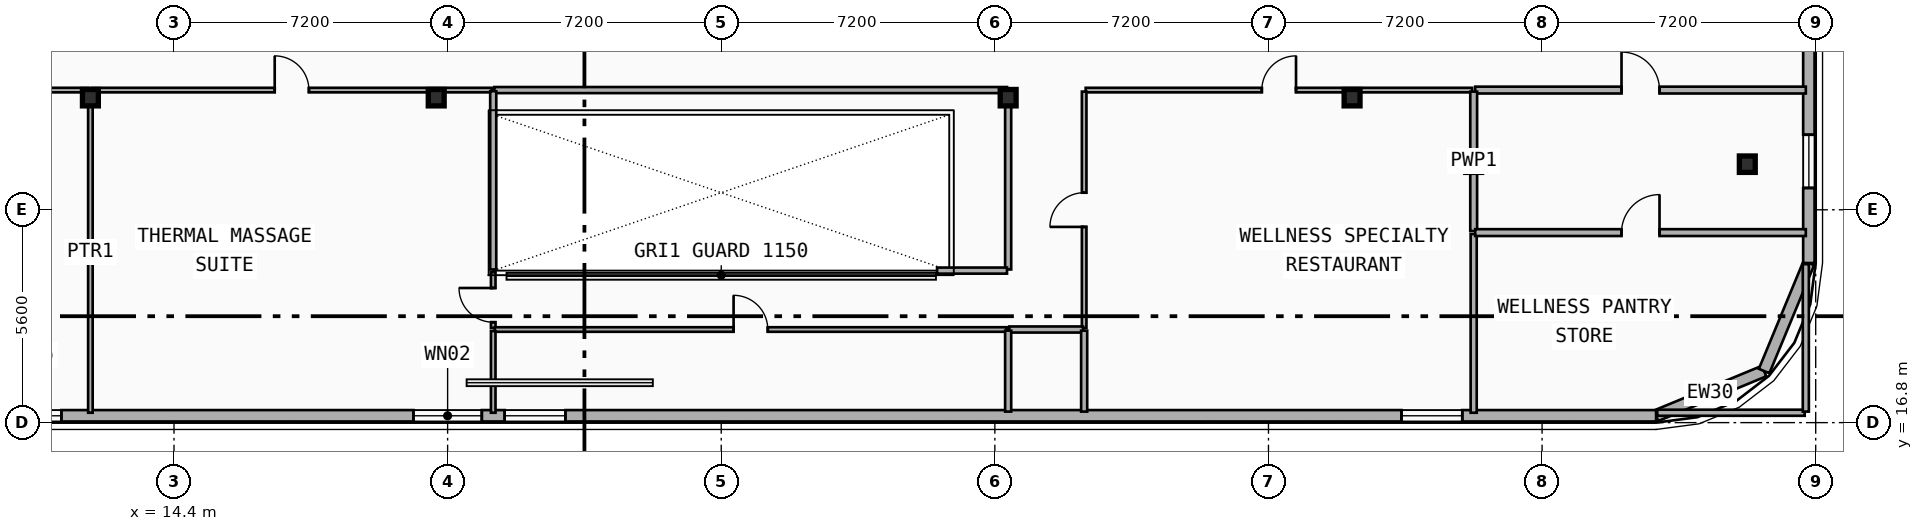
"""IFC4 building model, lengths in metres.
Left out: names, types, materials, properties, quantities, classifications, styles, units other than length and angle.
Written with IfcOpenShell. Run it as: python <this file> out.ifc"""

import sys

from ifc_helpers import new_model, si_unit, direction, frame, frame_2d, origin, origin_2d, place, context, subcontext, project, spatial, rectangle, i_section, extrude, element, fill, save


model = new_model("IFC4")
c1 = context("Model", 3, precision=1e-05, world=origin(), true_north=direction((0.0, 1.0)))
c2 = subcontext(c1, "Body", "Model", "MODEL_VIEW")
j1 = project(units=[si_unit("LENGTHUNIT", "METRE"), si_unit("PLANEANGLEUNIT", "RADIAN")], contexts=[c1])
p1 = place(None, origin())
s1 = spatial("IfcSite", under=j1, at=p1, CompositionType="ELEMENT")
p2 = place(p1, origin())
s2 = spatial("IfcBuilding", under=s1, at=p2, CompositionType="ELEMENT")
p3 = place(p2, frame((0.0, 0.0, 125.8)))
s3 = spatial("IfcBuildingStorey", under=s2, at=p3, CompositionType="ELEMENT", Elevation=125.8)
for number, where, z_axis, x_axis in (
    (1, (12.2, 25.35, 0.0), (0.0, 0.0, 1.0), (1.0, 0.0, 0.0)),
    (2, (21.3, 25.35, 0.0), (0.0, 0.0, 1.0), (1.0, 0.0, 0.0)),
    (3, (36.35, 25.35, 0.0), (0.0, 0.0, 1.0), (1.0, 0.0, 0.0)),
    (4, (45.4, 25.35, 0.0), (0.0, 0.0, 1.0), (1.0, 0.0, 0.0)),
    (5, (48.6, 23.6, 0.0), (0.0, 0.0, 1.0), (1.0, 0.0, 0.0)),
    (6, (55.8, 23.6, 0.0), (0.0, 0.0, 1.0), (1.0, 0.0, 0.0)),
):
    element("IfcColumn", number, at=place(p3, frame(where, z_axis=z_axis, x_axis=x_axis)), inside=s3, PredefinedType="COLUMN", context=c2, shape_type="SweptSolid", body=[
        extrude(i_section(OverallWidth=0.418, OverallDepth=0.432, WebThickness=0.035, FlangeThickness=0.056, FilletRadius=0.015, at=origin_2d()), origin(), (0.0, 0.0, 1.0), 3.5),
    ])
p4 = place(p3, frame((56.243, 18.157, 0.0), z_axis=(0.0, 0.0, 1.0), x_axis=(-0.923882414032, -0.382676475685, 0.0)))
e7 = element("IfcWall", 7, at=p4, inside=s3, PredefinedType="SOLIDWALL", context=c2, shape_type="SweptSolid", body=[
    extrude(rectangle(XDim=3.077, YDim=0.3, at=frame_2d((1.539, 0.0))), origin(), (0.0, 0.0, 1.0), 3.24),
])
p5 = place(p3, frame((57.42, 21.0, 0.0), z_axis=(0.0, 0.0, 1.0), x_axis=(-0.382636798336, -0.92389884758, 0.0)))
e8 = element("IfcWall", 8, at=p5, inside=s3, PredefinedType="SOLIDWALL", context=c2, shape_type="SweptSolid", body=[
    extrude(rectangle(XDim=3.077, YDim=0.3, at=frame_2d((1.538, 0.0))), origin(), (0.0, 0.0, 1.0), 3.24),
])
p6 = place(p3, frame((57.42, 39.0, 0.0), z_axis=(0.0, 0.0, 1.0), x_axis=(0.0, -1.0, 0.0)))
e9 = element("IfcWall", 9, at=p6, inside=s3, PredefinedType="SOLIDWALL", context=c2, shape_type="SweptSolid", body=[
    extrude(rectangle(XDim=18.0, YDim=0.3, at=frame_2d((9.0, 0.0))), origin(), (0.0, 0.0, 1.0), 3.24),
])
p7 = place(p6, frame((8.882, 0.0, 0.48)))
e10 = element("IfcOpeningElement", 10, at=p7, cuts=e9, PredefinedType="OPENING", context=c2, shape_type="SweptSolid", body=[
    extrude(rectangle(XDim=1.4, YDim=1.8, at=frame_2d((0.7, 0.9))), frame((0.0, 0.16, 0.0), z_axis=(0.0, -1.0, 0.0), x_axis=(1.0, 0.0, 0.0)), (0.0, 0.0, 1.0), 0.32),
])
p8 = place(p6, frame((3.621, 0.0, 0.48)))
e11 = element("IfcOpeningElement", 11, at=p8, cuts=e9, PredefinedType="OPENING", context=c2, shape_type="SweptSolid", body=[
    extrude(rectangle(XDim=1.4, YDim=1.8, at=frame_2d((0.7, 0.9))), frame((0.0, 0.16, 0.0), z_axis=(0.0, -1.0, 0.0), x_axis=(1.0, 0.0, 0.0)), (0.0, 0.0, 1.0), 0.32),
])
p9 = place(p6, frame((14.625, 0.0, 0.48)))
e12 = element("IfcOpeningElement", 12, at=p9, cuts=e9, PredefinedType="OPENING", context=c2, shape_type="SweptSolid", body=[
    extrude(rectangle(XDim=1.4, YDim=1.8, at=frame_2d((0.7, 0.9))), frame((0.0, 0.16, 0.0), z_axis=(0.0, -1.0, 0.0), x_axis=(1.0, 0.0, 0.0)), (0.0, 0.0, 1.0), 0.32),
])
p10 = place(p3, frame((53.4, 16.98, 0.0), z_axis=(0.0, 0.0, 1.0), x_axis=(-1.0, 0.0, 0.0)))
e13 = element("IfcWall", 13, at=p10, inside=s3, PredefinedType="SOLIDWALL", context=c2, shape_type="SweptSolid", body=[
    extrude(rectangle(XDim=49.2, YDim=0.3, at=frame_2d((24.6, 0.0))), origin(), (0.0, 0.0, 1.0), 3.24),
])
p11 = place(p10, frame((41.962, 0.0, 0.65)))
e14 = element("IfcOpeningElement", 14, at=p11, cuts=e13, PredefinedType="OPENING", context=c2, shape_type="SweptSolid", body=[
    extrude(rectangle(XDim=1.6, YDim=1.95, at=frame_2d((0.8, 0.975))), frame((0.0, 0.16, 0.0), z_axis=(0.0, -1.0, 0.0), x_axis=(1.0, 0.0, 0.0)), (0.0, 0.0, 1.0), 0.32),
])
p12 = place(p10, frame((30.9, 0.0, 0.48)))
e15 = element("IfcOpeningElement", 15, at=p12, cuts=e13, PredefinedType="OPENING", context=c2, shape_type="SweptSolid", body=[
    extrude(rectangle(XDim=1.8, YDim=1.8, at=frame_2d((0.9, 0.9))), frame((0.0, 0.16, 0.0), z_axis=(0.0, -1.0, 0.0), x_axis=(1.0, 0.0, 0.0)), (0.0, 0.0, 1.0), 0.32),
])
p13 = place(p10, frame((28.7, 0.0, 0.65)))
e16 = element("IfcOpeningElement", 16, at=p13, cuts=e13, PredefinedType="OPENING", context=c2, shape_type="SweptSolid", body=[
    extrude(rectangle(XDim=1.6, YDim=1.95, at=frame_2d((0.8, 0.975))), frame((0.0, 0.16, 0.0), z_axis=(0.0, -1.0, 0.0), x_axis=(1.0, 0.0, 0.0)), (0.0, 0.0, 1.0), 0.32),
])
p14 = place(p10, frame((5.1, 0.0, 0.65)))
e17 = element("IfcOpeningElement", 17, at=p14, cuts=e13, PredefinedType="OPENING", context=c2, shape_type="SweptSolid", body=[
    extrude(rectangle(XDim=1.6, YDim=1.95, at=frame_2d((0.8, 0.975))), frame((0.0, 0.16, 0.0), z_axis=(0.0, -1.0, 0.0), x_axis=(1.0, 0.0, 0.0)), (0.0, 0.0, 1.0), 0.32),
])
p15 = place(p3, frame((0.26, 25.55, 0.0), z_axis=(0.0, 0.0, 1.0), x_axis=(1.0, 0.0, 0.0)))
e18 = element("IfcWall", 18, at=p15, inside=s3, PredefinedType="PARTITIONING", context=c2, shape_type="SweptSolid", body=[
    extrude(rectangle(XDim=11.9, YDim=0.12, at=frame_2d((5.95, 0.0))), origin(), (0.0, 0.0, 1.0), 2.406),
])
p16 = place(p15, frame((5.5, 0.0, 0.0)))
e19 = element("IfcOpeningElement", 19, at=p16, cuts=e18, PredefinedType="OPENING", context=c2, shape_type="SweptSolid", body=[
    extrude(rectangle(XDim=0.9, YDim=2.1, at=frame_2d((0.45, 1.05))), frame((0.0, 0.07, 0.0), z_axis=(0.0, -1.0, 0.0), x_axis=(1.0, 0.0, 0.0)), (0.0, 0.0, 1.0), 0.14),
])
p17 = place(p3, frame((12.24, 25.55, 0.0), z_axis=(0.0, 0.0, 1.0), x_axis=(1.0, 0.0, 0.0)))
e20 = element("IfcWall", 20, at=p17, inside=s3, PredefinedType="PARTITIONING", context=c2, shape_type="SweptSolid", body=[
    extrude(rectangle(XDim=10.52, YDim=0.12, at=frame_2d((5.26, 0.0))), origin(), (0.0, 0.0, 1.0), 2.406),
])
p18 = place(p17, frame((4.81, 0.0, 0.0)))
e21 = element("IfcOpeningElement", 21, at=p18, cuts=e20, PredefinedType="OPENING", context=c2, shape_type="SweptSolid", body=[
    extrude(rectangle(XDim=0.9, YDim=2.1, at=frame_2d((0.45, 1.05))), frame((0.0, 0.07, 0.0), z_axis=(0.0, -1.0, 0.0), x_axis=(1.0, 0.0, 0.0)), (0.0, 0.0, 1.0), 0.14),
])
p19 = place(p3, frame((38.39, 25.55, 0.0), z_axis=(0.0, 0.0, 1.0), x_axis=(1.0, 0.0, 0.0)))
e22 = element("IfcWall", 22, at=p19, inside=s3, PredefinedType="PARTITIONING", context=c2, shape_type="SweptSolid", body=[
    extrude(rectangle(XDim=10.17, YDim=0.12, at=frame_2d((5.085, 0.0))), origin(), (0.0, 0.0, 1.0), 2.406),
])
p20 = place(p19, frame((4.635, 0.0, 0.0)))
e23 = element("IfcOpeningElement", 23, at=p20, cuts=e22, PredefinedType="OPENING", context=c2, shape_type="SweptSolid", body=[
    extrude(rectangle(XDim=0.9, YDim=2.1, at=frame_2d((0.45, 1.05))), frame((0.0, 0.07, 0.0), z_axis=(0.0, -1.0, 0.0), x_axis=(1.0, 0.0, 0.0)), (0.0, 0.0, 1.0), 0.14),
])
p21 = place(p3, frame((48.64, 25.55, 0.0), z_axis=(0.0, 0.0, 1.0), x_axis=(1.0, 0.0, 0.0)))
e24 = element("IfcWall", 24, at=p21, inside=s3, PredefinedType="PLUMBINGWALL", context=c2, shape_type="SweptSolid", body=[
    extrude(rectangle(XDim=8.7, YDim=0.18, at=frame_2d((4.35, 0.0))), origin(), (0.0, 0.0, 1.0), 2.57),
])
p22 = place(p21, frame((3.85, 0.0, 0.0)))
e25 = element("IfcOpeningElement", 25, at=p22, cuts=e24, PredefinedType="OPENING", context=c2, shape_type="SweptSolid", body=[
    extrude(rectangle(XDim=1.0, YDim=2.15, at=frame_2d((0.5, 1.075))), frame((0.0, 0.1, 0.0), z_axis=(0.0, -1.0, 0.0), x_axis=(1.0, 0.0, 0.0)), (0.0, 0.0, 1.0), 0.2),
])
p23 = place(p3, frame((38.35, 19.29, 0.0), z_axis=(0.0, 0.0, 1.0), x_axis=(0.0, 1.0, 0.0)))
e26 = element("IfcWall", 26, at=p23, inside=s3, PredefinedType="PARTITIONING", context=c2, shape_type="SweptSolid", body=[
    extrude(rectangle(XDim=6.22, YDim=0.12, at=frame_2d((3.11, 0.0))), origin(), (0.0, 0.0, 1.0), 2.77),
])
p24 = place(p23, frame((2.66, 0.0, 0.0)))
e27 = element("IfcOpeningElement", 27, at=p24, cuts=e26, PredefinedType="OPENING", context=c2, shape_type="SweptSolid", body=[
    extrude(rectangle(XDim=0.9, YDim=2.1, at=frame_2d((0.45, 1.05))), frame((0.0, 0.07, 0.0), z_axis=(0.0, -1.0, 0.0), x_axis=(1.0, 0.0, 0.0)), (0.0, 0.0, 1.0), 0.14),
])
p25 = place(p3, frame((22.8, 19.29, 0.0), z_axis=(0.0, 0.0, 1.0), x_axis=(0.0, 1.0, 0.0)))
e28 = element("IfcWall", 28, at=p25, inside=s3, PredefinedType="PARTITIONING", context=c2, shape_type="SweptSolid", body=[
    extrude(rectangle(XDim=1.47, YDim=0.12, at=frame_2d((0.735, 0.0))), origin(), (0.0, 0.0, 1.0), 2.68),
])
p26 = place(p25, frame((0.152, 0.0, 0.0)))
e29 = element("IfcOpeningElement", 29, at=p26, cuts=e28, PredefinedType="OPENING", context=c2, shape_type="SweptSolid", body=[
    extrude(rectangle(XDim=0.9, YDim=2.1, at=frame_2d((0.45, 1.05))), frame((0.0, 0.07, 0.0), z_axis=(0.0, -1.0, 0.0), x_axis=(1.0, 0.0, 0.0)), (0.0, 0.0, 1.0), 0.14),
])
p27 = place(p3, frame((22.84, 19.25, 0.0), z_axis=(0.0, 0.0, 1.0), x_axis=(1.0, 0.0, 0.0)))
e30 = element("IfcWall", 30, at=p27, inside=s3, PredefinedType="PARTITIONING", context=c2, shape_type="SweptSolid", body=[
    extrude(rectangle(XDim=13.47, YDim=0.12, at=frame_2d((6.735, 0.0))), origin(), (0.0, 0.0, 1.0), 2.406),
])
p28 = place(p27, frame((6.285, 0.0, 0.0)))
e31 = element("IfcOpeningElement", 31, at=p28, cuts=e30, PredefinedType="OPENING", context=c2, shape_type="SweptSolid", body=[
    extrude(rectangle(XDim=0.9, YDim=2.1, at=frame_2d((0.45, 1.05))), frame((0.0, 0.07, 0.0), z_axis=(0.0, -1.0, 0.0), x_axis=(1.0, 0.0, 0.0)), (0.0, 0.0, 1.0), 0.14),
])
p29 = place(p3, frame((12.2, 17.06, 0.0), z_axis=(0.0, 0.0, 1.0), x_axis=(0.0, 1.0, 0.0)))
e32 = element("IfcWall", 32, at=p29, inside=s3, PredefinedType="PARTITIONING", context=c2, shape_type="SweptSolid", body=[
    extrude(rectangle(XDim=8.45, YDim=0.12, at=frame_2d((4.225, 0.0))), origin(), (0.0, 0.0, 1.0), 2.406),
])
p30 = place(p3, frame((22.8, 17.06, 0.0), z_axis=(0.0, 0.0, 1.0), x_axis=(0.0, 1.0, 0.0)))
e33 = element("IfcWall", 33, at=p30, inside=s3, PredefinedType="PARTITIONING", context=c2, shape_type="SweptSolid", body=[
    extrude(rectangle(XDim=2.15, YDim=0.12, at=frame_2d((1.075, 0.0))), origin(), (0.0, 0.0, 1.0), 2.86),
])
p31 = place(p3, frame((48.6, 21.84, 0.0), z_axis=(0.0, 0.0, 1.0), x_axis=(0.0, 1.0, 0.0)))
e34 = element("IfcWall", 34, at=p31, inside=s3, PredefinedType="PLUMBINGWALL", context=c2, shape_type="SweptSolid", body=[
    extrude(rectangle(XDim=3.67, YDim=0.18, at=frame_2d((1.835, 0.0))), origin(), (0.0, 0.0, 1.0), 2.72),
])
p32 = place(p3, frame((48.6, 17.06, 0.0), z_axis=(0.0, 0.0, 1.0), x_axis=(0.0, 1.0, 0.0)))
e35 = element("IfcWall", 35, at=p32, inside=s3, PredefinedType="PARTITIONING", context=c2, shape_type="SweptSolid", body=[
    extrude(rectangle(XDim=4.7, YDim=0.16, at=frame_2d((2.35, 0.0))), origin(), (0.0, 0.0, 1.0), 2.72),
])
p33 = place(p3, frame((48.64, 21.8, 0.0), z_axis=(0.0, 0.0, 1.0), x_axis=(1.0, 0.0, 0.0)))
e36 = element("IfcWall", 36, at=p33, inside=s3, PredefinedType="PLUMBINGWALL", context=c2, shape_type="SweptSolid", body=[
    extrude(rectangle(XDim=8.7, YDim=0.18, at=frame_2d((4.35, 0.0))), origin(), (0.0, 0.0, 1.0), 2.57),
])
p34 = place(p33, frame((3.85, 0.0, 0.0)))
e37 = element("IfcOpeningElement", 37, at=p34, cuts=e36, PredefinedType="OPENING", context=c2, shape_type="SweptSolid", body=[
    extrude(rectangle(XDim=1.0, YDim=2.15, at=frame_2d((0.5, 1.075))), frame((0.0, 0.1, 0.0), z_axis=(0.0, -1.0, 0.0), x_axis=(1.0, 0.0, 0.0)), (0.0, 0.0, 1.0), 0.2),
])
p35 = place(p3, frame((22.83, 25.55, 0.0), z_axis=(0.0, 0.0, 1.0), x_axis=(1.0, 0.0, 0.0)))
e38 = element("IfcWall", 38, at=p35, inside=s3, PredefinedType="PARTITIONING", context=c2, shape_type="SweptSolid", body=[
    extrude(rectangle(XDim=13.49, YDim=0.16, at=frame_2d((6.745, 0.0))), origin(), (0.0, 0.0, 1.0), 2.406),
])
p36 = place(p3, frame((36.38, 19.25, 0.0), z_axis=(0.0, 0.0, 1.0), x_axis=(1.0, 0.0, 0.0)))
e39 = element("IfcWall", 39, at=p36, inside=s3, PredefinedType="PARTITIONING", context=c2, shape_type="SweptSolid", body=[
    extrude(rectangle(XDim=1.94, YDim=0.16, at=frame_2d((0.97, 0.0))), origin(), (0.0, 0.0, 1.0), 2.406),
])
p37 = place(p3, frame((36.35, 20.83, 0.0), z_axis=(0.0, 0.0, 1.0), x_axis=(0.0, 1.0, 0.0)))
e40 = element("IfcWall", 40, at=p37, inside=s3, PredefinedType="PARTITIONING", context=c2, shape_type="SweptSolid", body=[
    extrude(rectangle(XDim=4.69, YDim=0.16, at=frame_2d((2.345, 0.0))), origin(), (0.0, 0.0, 1.0), 2.406),
])
p38 = place(p3, frame((34.48, 20.8, 0.0), z_axis=(0.0, 0.0, 1.0), x_axis=(1.0, 0.0, 0.0)))
e41 = element("IfcWall", 41, at=p38, inside=s3, PredefinedType="PARTITIONING", context=c2, shape_type="SweptSolid", body=[
    extrude(rectangle(XDim=1.84, YDim=0.16, at=frame_2d((0.92, 0.0))), origin(), (0.0, 0.0, 1.0), 2.406),
])
p39 = place(p3, frame((22.8, 20.83, 0.0), z_axis=(0.0, 0.0, 1.0), x_axis=(0.0, 1.0, 0.0)))
e42 = element("IfcWall", 42, at=p39, inside=s3, PredefinedType="PARTITIONING", context=c2, shape_type="SweptSolid", body=[
    extrude(rectangle(XDim=4.69, YDim=0.16, at=frame_2d((2.345, 0.0))), origin(), (0.0, 0.0, 1.0), 2.68),
])
p40 = place(p3, frame((36.35, 17.09, 0.0), z_axis=(0.0, 0.0, 1.0), x_axis=(0.0, 1.0, 0.0)))
e43 = element("IfcWall", 43, at=p40, inside=s3, PredefinedType="PARTITIONING", context=c2, shape_type="SweptSolid", body=[
    extrude(rectangle(XDim=2.13, YDim=0.16, at=frame_2d((1.065, 0.0))), origin(), (0.0, 0.0, 1.0), 2.406),
])
p41 = place(p3, frame((38.35, 17.09, 0.0), z_axis=(0.0, 0.0, 1.0), x_axis=(0.0, 1.0, 0.0)))
e44 = element("IfcWall", 44, at=p41, inside=s3, PredefinedType="PARTITIONING", context=c2, shape_type="SweptSolid", body=[
    extrude(rectangle(XDim=2.13, YDim=0.16, at=frame_2d((1.065, 0.0))), origin(), (0.0, 0.0, 1.0), 2.77),
])
p42 = place(p3, frame((53.43, 17.06, 0.0), z_axis=(0.0, 0.0, 1.0), x_axis=(1.0, 0.0, 0.0)))
e45 = element("IfcWall", 45, at=p42, inside=s3, PredefinedType="PARTITIONING", context=c2, shape_type="SweptSolid", body=[
    extrude(rectangle(XDim=3.88, YDim=0.16, at=frame_2d((1.94, 0.0))), origin(), (0.0, 0.0, 1.0), 2.72),
])
p43 = place(p3, frame((57.34, 17.09, 0.0), z_axis=(0.0, 0.0, 1.0), x_axis=(0.0, 1.0, 0.0)))
e46 = element("IfcWall", 46, at=p43, inside=s3, PredefinedType="PARTITIONING", context=c2, shape_type="SweptSolid", body=[
    extrude(rectangle(XDim=3.88, YDim=0.16, at=frame_2d((1.94, 0.0))), origin(), (0.0, 0.0, 1.0), 3.24),
])
p44 = place(p9, origin())
e47 = element("IfcWindow", 47, at=p44, inside=s3, PartitioningType="SINGLE_PANEL", PredefinedType="WINDOW", context=c2, shape_type="SweptSolid", body=[
    extrude(rectangle(XDim=1.4, YDim=1.8, at=frame_2d((0.7, 0.9))), frame((0.0, 0.03, 0.0), z_axis=(0.0, -1.0, 0.0), x_axis=(1.0, 0.0, 0.0)), (0.0, 0.0, 1.0), 0.06),
])
fill(e12, e47)
p45 = place(p11, origin())
e48 = element("IfcWindow", 48, at=p45, inside=s3, PartitioningType="SINGLE_PANEL", PredefinedType="WINDOW", context=c2, shape_type="SweptSolid", body=[
    extrude(rectangle(XDim=1.6, YDim=1.95, at=frame_2d((0.8, 0.975))), frame((0.0, 0.03, 0.0), z_axis=(0.0, -1.0, 0.0), x_axis=(1.0, 0.0, 0.0)), (0.0, 0.0, 1.0), 0.06),
])
fill(e14, e48)
p46 = place(p12, origin())
e49 = element("IfcWindow", 49, at=p46, inside=s3, PartitioningType="SINGLE_PANEL", PredefinedType="WINDOW", context=c2, shape_type="SweptSolid", body=[
    extrude(rectangle(XDim=1.8, YDim=1.8, at=frame_2d((0.9, 0.9))), frame((0.0, 0.03, 0.0), z_axis=(0.0, -1.0, 0.0), x_axis=(1.0, 0.0, 0.0)), (0.0, 0.0, 1.0), 0.06),
])
fill(e15, e49)
p47 = place(p13, origin())
e50 = element("IfcWindow", 50, at=p47, inside=s3, PartitioningType="SINGLE_PANEL", PredefinedType="WINDOW", context=c2, shape_type="SweptSolid", body=[
    extrude(rectangle(XDim=1.6, YDim=1.95, at=frame_2d((0.8, 0.975))), frame((0.0, 0.03, 0.0), z_axis=(0.0, -1.0, 0.0), x_axis=(1.0, 0.0, 0.0)), (0.0, 0.0, 1.0), 0.06),
])
fill(e16, e50)
p48 = place(p14, origin())
e51 = element("IfcWindow", 51, at=p48, inside=s3, PartitioningType="SINGLE_PANEL", PredefinedType="WINDOW", context=c2, shape_type="SweptSolid", body=[
    extrude(rectangle(XDim=1.6, YDim=1.95, at=frame_2d((0.8, 0.975))), frame((0.0, 0.03, 0.0), z_axis=(0.0, -1.0, 0.0), x_axis=(1.0, 0.0, 0.0)), (0.0, 0.0, 1.0), 0.06),
])
fill(e17, e51)
p49 = place(p18, origin())
e52 = element("IfcDoor", 52, at=p49, inside=s3, OperationType="SINGLE_SWING_LEFT", PredefinedType="DOOR", context=c2, shape_type="SweptSolid", body=[
    extrude(rectangle(XDim=0.9, YDim=2.1, at=frame_2d((0.45, 1.05))), frame((0.0, 0.025, 0.0), z_axis=(0.0, -1.0, 0.0), x_axis=(1.0, 0.0, 0.0)), (0.0, 0.0, 1.0), 0.05),
])
fill(e21, e52)
p50 = place(p20, origin())
e53 = element("IfcDoor", 53, at=p50, inside=s3, OperationType="SINGLE_SWING_RIGHT", PredefinedType="DOOR", context=c2, shape_type="SweptSolid", body=[
    extrude(rectangle(XDim=0.9, YDim=2.1, at=frame_2d((0.45, 1.05))), frame((0.0, 0.025, 0.0), z_axis=(0.0, -1.0, 0.0), x_axis=(1.0, 0.0, 0.0)), (0.0, 0.0, 1.0), 0.05),
])
fill(e23, e53)
p51 = place(p22, origin())
e54 = element("IfcDoor", 54, at=p51, inside=s3, OperationType="SINGLE_SWING_LEFT", PredefinedType="DOOR", context=c2, shape_type="SweptSolid", body=[
    extrude(rectangle(XDim=1.0, YDim=2.15, at=frame_2d((0.5, 1.075))), frame((0.0, 0.025, 0.0), z_axis=(0.0, -1.0, 0.0), x_axis=(1.0, 0.0, 0.0)), (0.0, 0.0, 1.0), 0.05),
])
fill(e25, e54)
p52 = place(p24, origin())
e55 = element("IfcDoor", 55, at=p52, inside=s3, OperationType="SINGLE_SWING_LEFT", PredefinedType="DOOR", context=c2, shape_type="SweptSolid", body=[
    extrude(rectangle(XDim=0.9, YDim=2.1, at=frame_2d((0.45, 1.05))), frame((0.0, 0.025, 0.0), z_axis=(0.0, -1.0, 0.0), x_axis=(1.0, 0.0, 0.0)), (0.0, 0.0, 1.0), 0.05),
])
fill(e27, e55)
p53 = place(p26, origin())
e56 = element("IfcDoor", 56, at=p53, inside=s3, OperationType="SINGLE_SWING_RIGHT", PredefinedType="DOOR", context=c2, shape_type="SweptSolid", body=[
    extrude(rectangle(XDim=0.9, YDim=2.1, at=frame_2d((0.45, 1.05))), frame((0.0, 0.025, 0.0), z_axis=(0.0, -1.0, 0.0), x_axis=(1.0, 0.0, 0.0)), (0.0, 0.0, 1.0), 0.05),
])
fill(e29, e56)
p54 = place(p28, origin())
e57 = element("IfcDoor", 57, at=p54, inside=s3, OperationType="SINGLE_SWING_LEFT", PredefinedType="DOOR", context=c2, shape_type="SweptSolid", body=[
    extrude(rectangle(XDim=0.9, YDim=2.1, at=frame_2d((0.45, 1.05))), frame((0.0, 0.025, 0.0), z_axis=(0.0, -1.0, 0.0), x_axis=(1.0, 0.0, 0.0)), (0.0, 0.0, 1.0), 0.05),
])
fill(e31, e57)
p55 = place(p34, origin())
e58 = element("IfcDoor", 58, at=p55, inside=s3, OperationType="SINGLE_SWING_RIGHT", PredefinedType="DOOR", context=c2, shape_type="SweptSolid", body=[
    extrude(rectangle(XDim=1.0, YDim=2.15, at=frame_2d((0.5, 1.075))), frame((0.0, 0.025, 0.0), z_axis=(0.0, -1.0, 0.0), x_axis=(1.0, 0.0, 0.0)), (0.0, 0.0, 1.0), 0.05),
])
fill(e37, e58)
save(model, sys.argv[1])
